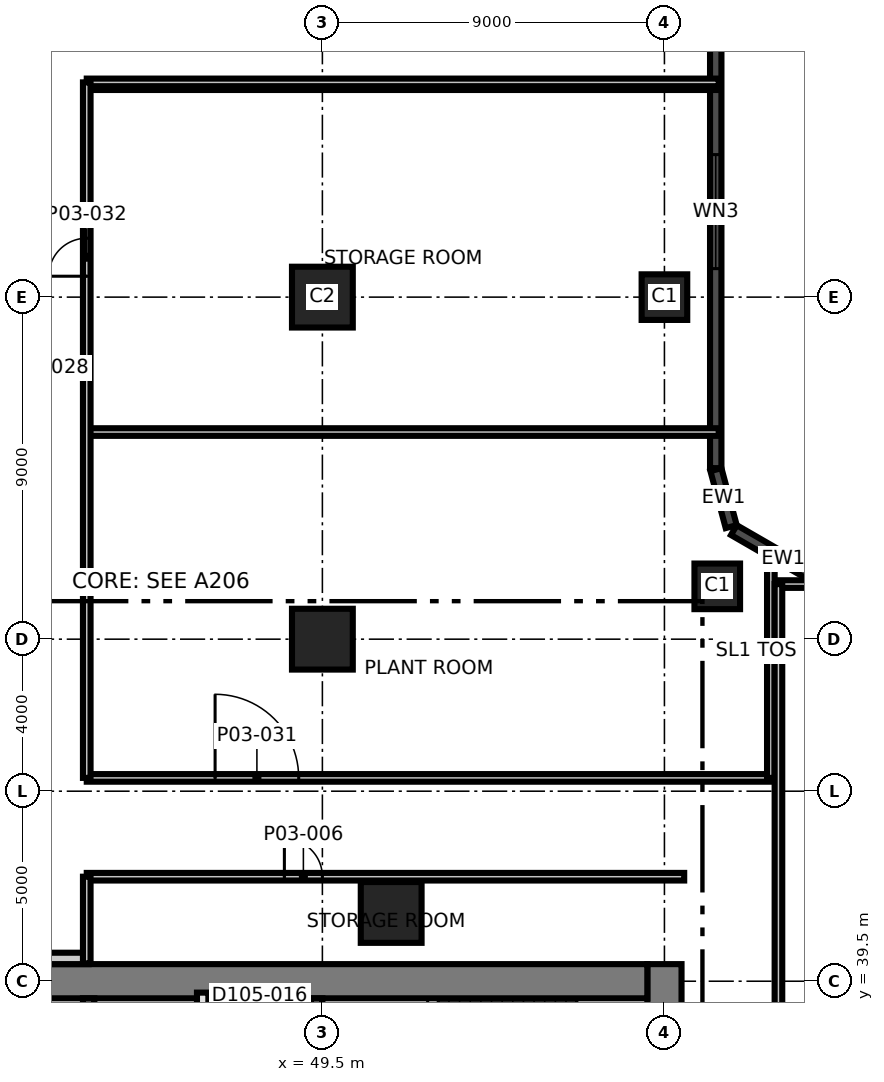
"""IFC4 building model, lengths in metres.
Left out: names, types, materials, properties, quantities, classifications, styles, units other than length and angle.
Written with IfcOpenShell. Run it as: python <this file> out.ifc"""

import sys

from ifc_helpers import new_model, si_unit, direction, frame, frame_2d, origin, origin_2d, place, context, subcontext, project, spatial, rectangle, extrude, element, fill, save


model = new_model("IFC4")
c1 = context("Model", 3, precision=1e-05, world=origin(), true_north=direction((0.0, 1.0)))
c2 = subcontext(c1, "Body", "Model", "MODEL_VIEW")
j1 = project(units=[si_unit("LENGTHUNIT", "METRE"), si_unit("PLANEANGLEUNIT", "RADIAN")], contexts=[c1])
p1 = place(None, origin())
s1 = spatial("IfcSite", under=j1, at=p1, CompositionType="ELEMENT")
p2 = place(p1, origin())
s2 = spatial("IfcBuilding", under=s1, at=p2, CompositionType="ELEMENT")
p3 = place(p2, frame((0.0, 0.0, 18.5)))
s3 = spatial("IfcBuildingStorey", under=s2, at=p3, CompositionType="ELEMENT", Elevation=18.5)
p4 = place(p3, frame((58.5, 21.05, 0.0), z_axis=(0.0, 0.0, 1.0), x_axis=(0.0, 1.0, 0.0)))
e1 = element("IfcWall", 1, at=p4, inside=s3, PredefinedType="SHEAR", context=c2, shape_type="SweptSolid", body=[
    extrude(rectangle(XDim=18.9, YDim=0.9, at=frame_2d((9.45, 0.0))), origin(), (0.0, 0.0, 1.0), 5.0),
])
p5 = place(p3, frame((31.05, 39.5, 0.0), z_axis=(0.0, 0.0, 1.0), x_axis=(1.0, 0.0, 0.0)))
e2 = element("IfcWall", 2, at=p5, inside=s3, PredefinedType="SHEAR", context=c2, shape_type="SweptSolid", body=[
    extrude(rectangle(XDim=27.0, YDim=0.9, at=frame_2d((13.5, 0.0))), origin(), (0.0, 0.0, 1.0), 5.0),
])
for number, where, z_axis, x_axis in (
    (3, (43.35, 33.5, 0.0), (0.0, 0.0, 1.0), (0.0, 1.0, 0.0)),
    (4, (49.35, 33.5, 0.0), (0.0, 0.0, 1.0), (0.0, 1.0, 0.0)),
):
    element("IfcWall", number, at=place(p3, frame(where, z_axis=z_axis, x_axis=x_axis)), inside=s3, PredefinedType="SHEAR", context=c2, shape_type="SweptSolid", body=[
        extrude(rectangle(XDim=5.55, YDim=0.3, at=frame_2d((2.775, 0.0))), origin(), (0.0, 0.0, 1.0), 5.0),
    ])
p6 = place(p3, frame((49.5, 48.5, 0.0), z_axis=(0.0, 0.0, 1.0), x_axis=(1.0, 0.0, 0.0)))
e5 = element("IfcColumn", 5, at=p6, inside=s3, PredefinedType="COLUMN", context=c2, shape_type="SweptSolid", body=[
    extrude(rectangle(XDim=1.6, YDim=1.6, at=origin_2d()), origin(), (0.0, 0.0, 1.0), 5.0),
])
p7 = place(p3, frame((59.89, 49.89, 0.0), z_axis=(0.0, 0.0, 1.0), x_axis=(1.0, 0.0, 0.0)))
e6 = element("IfcColumn", 6, at=p7, inside=s3, PredefinedType="COLUMN", context=c2, shape_type="SweptSolid", body=[
    extrude(rectangle(XDim=1.2, YDim=1.2, at=origin_2d()), origin(), (0.0, 0.0, 1.0), 5.0),
])
p8 = place(p3, frame((49.5, 57.5, 0.0), z_axis=(0.0, 0.0, 1.0), x_axis=(1.0, 0.0, 0.0)))
e7 = element("IfcColumn", 7, at=p8, inside=s3, PredefinedType="COLUMN", context=c2, shape_type="SweptSolid", body=[
    extrude(rectangle(XDim=1.6, YDim=1.6, at=origin_2d()), origin(), (0.0, 0.0, 1.0), 5.0),
])
p9 = place(p3, frame((58.5, 57.5, 0.0), z_axis=(0.0, 0.0, 1.0), x_axis=(1.0, 0.0, 0.0)))
e8 = element("IfcColumn", 8, at=p9, inside=s3, PredefinedType="COLUMN", context=c2, shape_type="SweptSolid", body=[
    extrude(rectangle(XDim=1.2, YDim=1.2, at=origin_2d()), origin(), (0.0, 0.0, 1.0), 5.0),
])
p10 = place(p3, frame((51.31, 41.31, 0.0), z_axis=(0.0, 0.0, 1.0), x_axis=(1.0, 0.0, 0.0)))
e9 = element("IfcColumn", 9, at=p10, inside=s3, PredefinedType="COLUMN", context=c2, shape_type="SweptSolid", body=[
    extrude(rectangle(XDim=1.6, YDim=1.6, at=origin_2d()), origin(), (0.0, 0.0, 1.0), 5.0),
])
p11 = place(p3, frame((62.925, 49.87, 0.0), z_axis=(0.0, 0.0, 1.0), x_axis=(-0.866031096941, 0.499990139034, 0.0)))
e10 = element("IfcWall", 10, at=p11, inside=s3, PredefinedType="SOLIDWALL", context=c2, shape_type="SweptSolid", body=[
    extrude(rectangle(XDim=3.0, YDim=0.3, at=frame_2d((1.5, 0.0))), origin(), (0.0, 0.0, 1.0), 4.7),
])
p12 = place(p3, frame((60.257, 51.461, 0.0), z_axis=(0.0, 0.0, 1.0), x_axis=(-0.258777996848, 0.965936824201, 0.0)))
e11 = element("IfcWall", 11, at=p12, inside=s3, PredefinedType="SOLIDWALL", context=c2, shape_type="SweptSolid", body=[
    extrude(rectangle(XDim=1.553, YDim=0.3, at=frame_2d((0.776, 0.0))), origin(), (0.0, 0.0, 1.0), 4.7),
])
p13 = place(p3, frame((59.85, 53.0, 0.0), z_axis=(0.0, 0.0, 1.0), x_axis=(0.0, 1.0, 0.0)))
e12 = element("IfcWall", 12, at=p13, inside=s3, PredefinedType="SOLIDWALL", context=c2, shape_type="SweptSolid", body=[
    extrude(rectangle(XDim=26.928, YDim=0.3, at=frame_2d((13.464, 0.0))), origin(), (0.0, 0.0, 1.0), 4.7),
])
p14 = place(p13, frame((5.25, 0.0, 0.9)))
e13 = element("IfcOpeningElement", 13, at=p14, cuts=e12, PredefinedType="OPENING", context=c2, shape_type="SweptSolid", body=[
    extrude(rectangle(XDim=3.0, YDim=2.4, at=frame_2d((1.5, 1.2))), frame((0.0, 0.16, 0.0), z_axis=(0.0, -1.0, 0.0), x_axis=(1.0, 0.0, 0.0)), (0.0, 0.0, 1.0), 0.32),
])
p15 = place(p13, frame((14.25, 0.0, 0.9)))
e14 = element("IfcOpeningElement", 14, at=p15, cuts=e12, PredefinedType="OPENING", context=c2, shape_type="SweptSolid", body=[
    extrude(rectangle(XDim=3.0, YDim=2.4, at=frame_2d((1.5, 1.2))), frame((0.0, 0.16, 0.0), z_axis=(0.0, -1.0, 0.0), x_axis=(1.0, 0.0, 0.0)), (0.0, 0.0, 1.0), 0.32),
])
p16 = place(p13, frame((18.75, 0.0, 0.9)))
e15 = element("IfcOpeningElement", 15, at=p16, cuts=e12, PredefinedType="OPENING", context=c2, shape_type="SweptSolid", body=[
    extrude(rectangle(XDim=3.0, YDim=2.4, at=frame_2d((1.5, 1.2))), frame((0.0, 0.16, 0.0), z_axis=(0.0, -1.0, 0.0), x_axis=(1.0, 0.0, 0.0)), (0.0, 0.0, 1.0), 0.32),
])
p17 = place(p13, frame((23.25, 0.0, 0.9)))
e16 = element("IfcOpeningElement", 16, at=p17, cuts=e12, PredefinedType="OPENING", context=c2, shape_type="SweptSolid", body=[
    extrude(rectangle(XDim=3.0, YDim=2.4, at=frame_2d((1.5, 1.2))), frame((0.0, 0.16, 0.0), z_axis=(0.0, -1.0, 0.0), x_axis=(1.0, 0.0, 0.0)), (0.0, 0.0, 1.0), 0.32),
])
p18 = place(p3, frame((40.65, 40.1, 0.0), z_axis=(0.0, 0.0, 1.0), x_axis=(1.0, 0.0, 0.0)))
e17 = element("IfcWall", 17, at=p18, inside=s3, PredefinedType="PARTITIONING", context=c2, shape_type="SweptSolid", body=[
    extrude(rectangle(XDim=2.7, YDim=0.3, at=frame_2d((1.35, 0.0))), origin(), (0.0, 0.0, 1.0), 4.7),
])
p19 = place(p3, frame((46.35, 36.2, 0.0), z_axis=(0.0, 0.0, 1.0), x_axis=(0.0, 1.0, 0.0)))
e18 = element("IfcWall", 18, at=p19, inside=s3, PredefinedType="SOLIDWALL", context=c2, shape_type="SweptSolid", body=[
    extrude(rectangle(XDim=3.0, YDim=0.3, at=frame_2d((1.5, 0.0))), origin(), (0.0, 0.0, 1.0), 4.7),
])
p20 = place(p3, frame((43.3, 42.25, 0.0), z_axis=(0.0, 0.0, 1.0), x_axis=(1.0, 0.0, 0.0)))
e19 = element("IfcWall", 19, at=p20, inside=s3, PredefinedType="PARTITIONING", context=c2, shape_type="SweptSolid", body=[
    extrude(rectangle(XDim=15.72, YDim=0.2, at=frame_2d((7.86, 0.0))), origin(), (0.0, 0.0, 1.0), 4.7),
])
p21 = place(p20, frame((5.2, 0.0, 0.0)))
e20 = element("IfcOpeningElement", 20, at=p21, cuts=e19, PredefinedType="OPENING", context=c2, shape_type="SweptSolid", body=[
    extrude(rectangle(XDim=1.0, YDim=2.1, at=frame_2d((0.5, 1.05))), frame((0.0, 0.11, 0.0), z_axis=(0.0, -1.0, 0.0), x_axis=(1.0, 0.0, 0.0)), (0.0, 0.0, 1.0), 0.22),
])
p22 = place(p3, frame((43.3, 44.85, 0.0), z_axis=(0.0, 0.0, 1.0), x_axis=(1.0, 0.0, 0.0)))
e21 = element("IfcWall", 21, at=p22, inside=s3, PredefinedType="PARTITIONING", context=c2, shape_type="SweptSolid", body=[
    extrude(rectangle(XDim=18.2, YDim=0.2, at=frame_2d((9.1, 0.0))), origin(), (0.0, 0.0, 1.0), 4.7),
])
p23 = place(p22, frame((3.377, 0.0, 0.0)))
e22 = element("IfcOpeningElement", 22, at=p23, cuts=e21, PredefinedType="OPENING", context=c2, shape_type="SweptSolid", body=[
    extrude(rectangle(XDim=2.2, YDim=2.4, at=frame_2d((1.1, 1.2))), frame((0.0, 0.11, 0.0), z_axis=(0.0, -1.0, 0.0), x_axis=(1.0, 0.0, 0.0)), (0.0, 0.0, 1.0), 0.22),
])
p24 = place(p3, frame((61.5, 49.95, 0.0), z_axis=(0.0, 0.0, 1.0), x_axis=(1.0, 0.0, 0.0)))
e23 = element("IfcWall", 23, at=p24, inside=s3, PredefinedType="PARTITIONING", context=c2, shape_type="SweptSolid", body=[
    extrude(rectangle(XDim=1.416, YDim=0.2, at=frame_2d((0.708, 0.0))), origin(), (0.0, 0.0, 1.0), 4.7),
])
for number, where, z_axis, x_axis in (
    (24, (43.3, 53.95, 0.0), (0.0, 0.0, 1.0), (1.0, 0.0, 0.0)),
    (25, (43.3, 63.05, 0.0), (0.0, 0.0, 1.0), (1.0, 0.0, 0.0)),
    (26, (43.3, 63.15, 0.0), (0.0, 0.0, 1.0), (1.0, 0.0, 0.0)),
):
    element("IfcWall", number, at=place(p3, frame(where, z_axis=z_axis, x_axis=x_axis)), inside=s3, PredefinedType="PARTITIONING", context=c2, shape_type="SweptSolid", body=[
        extrude(rectangle(XDim=16.63, YDim=0.2, at=frame_2d((8.315, 0.0))), origin(), (0.0, 0.0, 1.0), 4.7),
    ])
p25 = place(p3, frame((43.3, 39.97, 0.0), z_axis=(0.0, 0.0, 1.0), x_axis=(0.0, 1.0, 0.0)))
e27 = element("IfcWall", 27, at=p25, inside=s3, PredefinedType="PARTITIONING", context=c2, shape_type="SweptSolid", body=[
    extrude(rectangle(XDim=2.28, YDim=0.2, at=frame_2d((1.14, 0.0))), origin(), (0.0, 0.0, 1.0), 4.7),
])
p26 = place(p3, frame((43.3, 44.85, 0.0), z_axis=(0.0, 0.0, 1.0), x_axis=(0.0, 1.0, 0.0)))
e28 = element("IfcWall", 28, at=p26, inside=s3, PredefinedType="PARTITIONING", context=c2, shape_type="SweptSolid", body=[
    extrude(rectangle(XDim=18.3, YDim=0.2, at=frame_2d((9.15, 0.0))), origin(), (0.0, 0.0, 1.0), 4.7),
])
p27 = place(p26, frame((13.2, 0.0, 0.0)))
e29 = element("IfcOpeningElement", 29, at=p27, cuts=e28, PredefinedType="OPENING", context=c2, shape_type="SweptSolid", body=[
    extrude(rectangle(XDim=1.0, YDim=2.1, at=frame_2d((0.5, 1.05))), frame((0.0, 0.11, 0.0), z_axis=(0.0, -1.0, 0.0), x_axis=(1.0, 0.0, 0.0)), (0.0, 0.0, 1.0), 0.22),
])
p28 = place(p3, frame((61.3, 44.85, 0.0), z_axis=(0.0, 0.0, 1.0), x_axis=(0.0, 1.0, 0.0)))
e30 = element("IfcWall", 30, at=p28, inside=s3, PredefinedType="PARTITIONING", context=c2, shape_type="SweptSolid", body=[
    extrude(rectangle(XDim=5.742, YDim=0.2, at=frame_2d((2.871, 0.0))), origin(), (0.0, 0.0, 1.0), 4.7),
])
p29 = place(p3, frame((61.5, 33.5, 0.0), z_axis=(0.0, 0.0, 1.0), x_axis=(0.0, 1.0, 0.0)))
e31 = element("IfcWall", 31, at=p29, inside=s3, PredefinedType="PARTITIONING", context=c2, shape_type="SweptSolid", body=[
    extrude(rectangle(XDim=16.45, YDim=0.2, at=frame_2d((8.225, 0.0))), origin(), (0.0, 0.0, 1.0), 4.7),
])
p30 = place(p29, frame((1.542, 0.0, 0.0)))
e32 = element("IfcOpeningElement", 32, at=p30, cuts=e31, PredefinedType="OPENING", context=c2, shape_type="SweptSolid", body=[
    extrude(rectangle(XDim=1.0, YDim=2.1, at=frame_2d((0.5, 1.05))), frame((0.0, 0.11, 0.0), z_axis=(0.0, -1.0, 0.0), x_axis=(1.0, 0.0, 0.0)), (0.0, 0.0, 1.0), 0.22),
])
p31 = place(p14, origin())
e33 = element("IfcWindow", 33, at=p31, inside=s3, PartitioningType="SINGLE_PANEL", PredefinedType="WINDOW", context=c2, shape_type="SweptSolid", body=[
    extrude(rectangle(XDim=3.0, YDim=2.4, at=frame_2d((1.5, 1.2))), frame((0.0, 0.03, 0.0), z_axis=(0.0, -1.0, 0.0), x_axis=(1.0, 0.0, 0.0)), (0.0, 0.0, 1.0), 0.06),
])
fill(e13, e33)
p32 = place(p21, origin())
e34 = element("IfcDoor", 34, at=p32, inside=s3, OperationType="SINGLE_SWING_RIGHT", PredefinedType="DOOR", context=c2, shape_type="SweptSolid", body=[
    extrude(rectangle(XDim=1.0, YDim=2.1, at=frame_2d((0.5, 1.05))), frame((0.0, 0.025, 0.0), z_axis=(0.0, -1.0, 0.0), x_axis=(1.0, 0.0, 0.0)), (0.0, 0.0, 1.0), 0.05),
])
fill(e20, e34)
p33 = place(p23, origin())
e35 = element("IfcDoor", 35, at=p33, inside=s3, OperationType="SINGLE_SWING_LEFT", PredefinedType="DOOR", context=c2, shape_type="SweptSolid", body=[
    extrude(rectangle(XDim=2.2, YDim=2.4, at=frame_2d((1.1, 1.2))), frame((0.0, 0.025, 0.0), z_axis=(0.0, -1.0, 0.0), x_axis=(1.0, 0.0, 0.0)), (0.0, 0.0, 1.0), 0.05),
])
fill(e22, e35)
p34 = place(p27, origin())
e36 = element("IfcDoor", 36, at=p34, inside=s3, OperationType="SINGLE_SWING_RIGHT", PredefinedType="DOOR", context=c2, shape_type="SweptSolid", body=[
    extrude(rectangle(XDim=1.0, YDim=2.1, at=frame_2d((0.5, 1.05))), frame((0.0, 0.025, 0.0), z_axis=(0.0, -1.0, 0.0), x_axis=(1.0, 0.0, 0.0)), (0.0, 0.0, 1.0), 0.05),
])
fill(e29, e36)
save(model, sys.argv[1])
